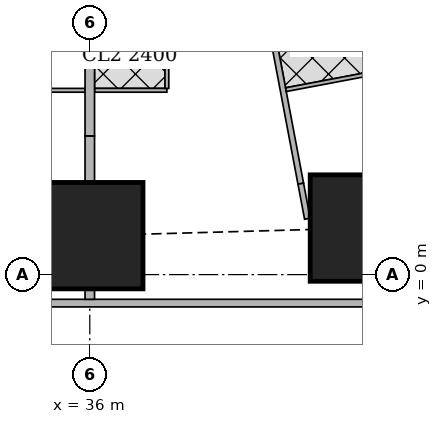
"""IFC4 building model, lengths in metres.
Left out: names, types, materials, properties, quantities, classifications, styles, units other than length and angle.
Written with IfcOpenShell. Run it as: python <this file> out.ifc"""

import sys

from ifc_helpers import new_model, si_unit, direction, frame, frame_2d, origin, origin_2d, place, context, subcontext, project, spatial, rectangle, extrude, element, fill, save


model = new_model("IFC4")
c1 = context("Model", 3, precision=1e-05, world=origin(), true_north=direction((0.0, 1.0)))
c2 = subcontext(c1, "Body", "Model", "MODEL_VIEW")
j1 = project(units=[si_unit("LENGTHUNIT", "METRE"), si_unit("PLANEANGLEUNIT", "RADIAN")], contexts=[c1])
p1 = place(None, origin())
s1 = spatial("IfcSite", under=j1, at=p1, CompositionType="ELEMENT")
p2 = place(p1, origin())
s2 = spatial("IfcBuilding", under=s1, at=p2, CompositionType="ELEMENT")
p3 = place(p2, frame((0.0, 0.0, 53.75)))
s3 = spatial("IfcBuildingStorey", under=s2, at=p3, CompositionType="ELEMENT", Elevation=53.75)
for number, where, z_axis, x_axis in (
    (1, (36.0, 1.025, 0.0), (0.0, 0.0, 1.0), (1.0, 0.0, 0.0)),
    (2, (43.2, 1.225, 0.0), (0.0, 0.0, 1.0), (1.0, 0.0, 0.0)),
):
    element("IfcColumn", number, at=place(p3, frame(where, z_axis=z_axis, x_axis=x_axis)), inside=s3, PredefinedType="COLUMN", context=c2, shape_type="SweptSolid", body=[
        extrude(rectangle(XDim=2.8, YDim=2.8, at=origin_2d()), origin(), (0.0, 0.0, 1.0), 3.75),
    ])
p4 = place(p3, frame((2.163, -0.75, 0.0), z_axis=(0.0, 0.0, 1.0), x_axis=(1.0, 0.0, 0.0)))
e3 = element("IfcWall", 3, at=p4, inside=s3, PredefinedType="SOLIDWALL", context=c2, shape_type="SweptSolid", body=[
    extrude(rectangle(XDim=45.628, YDim=0.2, at=frame_2d((22.814, 0.0))), origin(), (0.0, 0.0, 1.0), 3.5),
])
p5 = place(p4, frame((9.537, 0.0, 0.9)))
e4 = element("IfcOpeningElement", 4, at=p5, cuts=e3, PredefinedType="OPENING", context=c2, shape_type="SweptSolid", body=[
    extrude(rectangle(XDim=1.8, YDim=1.5, at=frame_2d((0.9, 0.75))), frame((0.0, 0.11, 0.0), z_axis=(0.0, -1.0, 0.0), x_axis=(1.0, 0.0, 0.0)), (0.0, 0.0, 1.0), 0.22),
])
p6 = place(p4, frame((13.137, 0.0, 0.9)))
e5 = element("IfcOpeningElement", 5, at=p6, cuts=e3, PredefinedType="OPENING", context=c2, shape_type="SweptSolid", body=[
    extrude(rectangle(XDim=1.8, YDim=1.5, at=frame_2d((0.9, 0.75))), frame((0.0, 0.11, 0.0), z_axis=(0.0, -1.0, 0.0), x_axis=(1.0, 0.0, 0.0)), (0.0, 0.0, 1.0), 0.22),
])
p7 = place(p4, frame((16.737, 0.0, 0.9)))
e6 = element("IfcOpeningElement", 6, at=p7, cuts=e3, PredefinedType="OPENING", context=c2, shape_type="SweptSolid", body=[
    extrude(rectangle(XDim=1.8, YDim=1.5, at=frame_2d((0.9, 0.75))), frame((0.0, 0.11, 0.0), z_axis=(0.0, -1.0, 0.0), x_axis=(1.0, 0.0, 0.0)), (0.0, 0.0, 1.0), 0.22),
])
p8 = place(p4, frame((20.337, 0.0, 0.9)))
e7 = element("IfcOpeningElement", 7, at=p8, cuts=e3, PredefinedType="OPENING", context=c2, shape_type="SweptSolid", body=[
    extrude(rectangle(XDim=1.8, YDim=1.5, at=frame_2d((0.9, 0.75))), frame((0.0, 0.11, 0.0), z_axis=(0.0, -1.0, 0.0), x_axis=(1.0, 0.0, 0.0)), (0.0, 0.0, 1.0), 0.22),
])
p9 = place(p4, frame((23.937, 0.0, 0.9)))
e8 = element("IfcOpeningElement", 8, at=p9, cuts=e3, PredefinedType="OPENING", context=c2, shape_type="SweptSolid", body=[
    extrude(rectangle(XDim=1.8, YDim=1.5, at=frame_2d((0.9, 0.75))), frame((0.0, 0.11, 0.0), z_axis=(0.0, -1.0, 0.0), x_axis=(1.0, 0.0, 0.0)), (0.0, 0.0, 1.0), 0.22),
])
p10 = place(p4, frame((27.537, 0.0, 0.9)))
e9 = element("IfcOpeningElement", 9, at=p10, cuts=e3, PredefinedType="OPENING", context=c2, shape_type="SweptSolid", body=[
    extrude(rectangle(XDim=1.8, YDim=1.5, at=frame_2d((0.9, 0.75))), frame((0.0, 0.11, 0.0), z_axis=(0.0, -1.0, 0.0), x_axis=(1.0, 0.0, 0.0)), (0.0, 0.0, 1.0), 0.22),
])
p11 = place(p4, frame((31.137, 0.0, 0.9)))
e10 = element("IfcOpeningElement", 10, at=p11, cuts=e3, PredefinedType="OPENING", context=c2, shape_type="SweptSolid", body=[
    extrude(rectangle(XDim=1.8, YDim=1.5, at=frame_2d((0.9, 0.75))), frame((0.0, 0.11, 0.0), z_axis=(0.0, -1.0, 0.0), x_axis=(1.0, 0.0, 0.0)), (0.0, 0.0, 1.0), 0.22),
])
p12 = place(p4, frame((34.737, 0.0, 0.9)))
e11 = element("IfcOpeningElement", 11, at=p12, cuts=e3, PredefinedType="OPENING", context=c2, shape_type="SweptSolid", body=[
    extrude(rectangle(XDim=1.8, YDim=1.5, at=frame_2d((0.9, 0.75))), frame((0.0, 0.11, 0.0), z_axis=(0.0, -1.0, 0.0), x_axis=(1.0, 0.0, 0.0)), (0.0, 0.0, 1.0), 0.22),
])
p13 = place(p3, frame((50.653, 2.703, 0.0), z_axis=(0.0, 0.0, 1.0), x_axis=(-0.185612026696, 0.982623109613, 0.0)))
e12 = element("IfcWall", 12, at=p13, inside=s3, PredefinedType="SOLIDWALL", context=c2, shape_type="SweptSolid", body=[
    extrude(rectangle(XDim=41.393, YDim=0.2, at=frame_2d((20.697, 0.0))), origin(), (0.0, 0.0, 1.0), 3.5),
])
p14 = place(p13, frame((1.633, 0.0, 0.9)))
e13 = element("IfcOpeningElement", 13, at=p14, cuts=e12, PredefinedType="OPENING", context=c2, shape_type="SweptSolid", body=[
    extrude(rectangle(XDim=1.8, YDim=1.5, at=frame_2d((0.9, 0.75))), frame((0.0, 0.11, 0.0), z_axis=(0.0, -1.0, 0.0), x_axis=(1.0, 0.0, 0.0)), (0.0, 0.0, 1.0), 0.22),
])
p15 = place(p13, frame((6.032, 0.0, 0.9)))
e14 = element("IfcOpeningElement", 14, at=p15, cuts=e12, PredefinedType="OPENING", context=c2, shape_type="SweptSolid", body=[
    extrude(rectangle(XDim=1.8, YDim=1.5, at=frame_2d((0.9, 0.75))), frame((0.0, 0.11, 0.0), z_axis=(0.0, -1.0, 0.0), x_axis=(1.0, 0.0, 0.0)), (0.0, 0.0, 1.0), 0.22),
])
p16 = place(p13, frame((9.848, 0.0, 0.9)))
e15 = element("IfcOpeningElement", 15, at=p16, cuts=e12, PredefinedType="OPENING", context=c2, shape_type="SweptSolid", body=[
    extrude(rectangle(XDim=1.8, YDim=1.5, at=frame_2d((0.9, 0.75))), frame((0.0, 0.11, 0.0), z_axis=(0.0, -1.0, 0.0), x_axis=(1.0, 0.0, 0.0)), (0.0, 0.0, 1.0), 0.22),
])
p17 = place(p13, frame((17.481, 0.0, 0.9)))
e16 = element("IfcOpeningElement", 16, at=p17, cuts=e12, PredefinedType="OPENING", context=c2, shape_type="SweptSolid", body=[
    extrude(rectangle(XDim=1.8, YDim=1.5, at=frame_2d((0.9, 0.75))), frame((0.0, 0.11, 0.0), z_axis=(0.0, -1.0, 0.0), x_axis=(1.0, 0.0, 0.0)), (0.0, 0.0, 1.0), 0.22),
])
p18 = place(p13, frame((21.297, 0.0, 0.9)))
e17 = element("IfcOpeningElement", 17, at=p18, cuts=e12, PredefinedType="OPENING", context=c2, shape_type="SweptSolid", body=[
    extrude(rectangle(XDim=1.8, YDim=1.5, at=frame_2d((0.9, 0.75))), frame((0.0, 0.11, 0.0), z_axis=(0.0, -1.0, 0.0), x_axis=(1.0, 0.0, 0.0)), (0.0, 0.0, 1.0), 0.22),
])
p19 = place(p13, frame((25.113, 0.0, 0.9)))
e18 = element("IfcOpeningElement", 18, at=p19, cuts=e12, PredefinedType="OPENING", context=c2, shape_type="SweptSolid", body=[
    extrude(rectangle(XDim=1.8, YDim=1.5, at=frame_2d((0.9, 0.75))), frame((0.0, 0.11, 0.0), z_axis=(0.0, -1.0, 0.0), x_axis=(1.0, 0.0, 0.0)), (0.0, 0.0, 1.0), 0.22),
])
p20 = place(p13, frame((28.93, 0.0, 0.9)))
e19 = element("IfcOpeningElement", 19, at=p20, cuts=e12, PredefinedType="OPENING", context=c2, shape_type="SweptSolid", body=[
    extrude(rectangle(XDim=1.8, YDim=1.5, at=frame_2d((0.9, 0.75))), frame((0.0, 0.11, 0.0), z_axis=(0.0, -1.0, 0.0), x_axis=(1.0, 0.0, 0.0)), (0.0, 0.0, 1.0), 0.22),
])
p21 = place(p13, frame((32.746, 0.0, 0.9)))
e20 = element("IfcOpeningElement", 20, at=p21, cuts=e12, PredefinedType="OPENING", context=c2, shape_type="SweptSolid", body=[
    extrude(rectangle(XDim=1.8, YDim=1.5, at=frame_2d((0.9, 0.75))), frame((0.0, 0.11, 0.0), z_axis=(0.0, -1.0, 0.0), x_axis=(1.0, 0.0, 0.0)), (0.0, 0.0, 1.0), 0.22),
])
p22 = place(p13, frame((36.481, 0.0, 0.9)))
e21 = element("IfcOpeningElement", 21, at=p22, cuts=e12, PredefinedType="OPENING", context=c2, shape_type="SweptSolid", body=[
    extrude(rectangle(XDim=1.8, YDim=1.5, at=frame_2d((0.9, 0.75))), frame((0.0, 0.11, 0.0), z_axis=(0.0, -1.0, 0.0), x_axis=(1.0, 0.0, 0.0)), (0.0, 0.0, 1.0), 0.22),
])
p23 = place(p3, frame((35.094, 36.585, 0.0), z_axis=(0.0, 0.0, 1.0), x_axis=(0.185588860311, -0.982627485331, 0.0)))
e22 = element("IfcWall", 22, at=p23, inside=s3, PredefinedType="SOLIDWALL", context=c2, shape_type="SweptSolid", body=[
    extrude(rectangle(XDim=34.797, YDim=0.15, at=frame_2d((17.399, 0.0))), origin(), (0.0, 0.0, 1.0), 2.5),
])
p24 = place(p23, frame((9.828, 0.0, 0.0)))
e23 = element("IfcOpeningElement", 23, at=p24, cuts=e22, PredefinedType="OPENING", context=c2, shape_type="SweptSolid", body=[
    extrude(rectangle(XDim=1.0, YDim=2.1, at=frame_2d((0.5, 1.05))), frame((0.0, 0.085, 0.0), z_axis=(0.0, -1.0, 0.0), x_axis=(1.0, 0.0, 0.0)), (0.0, 0.0, 1.0), 0.17),
])
p25 = place(p23, frame((13.645, 0.0, 0.0)))
e24 = element("IfcOpeningElement", 24, at=p25, cuts=e22, PredefinedType="OPENING", context=c2, shape_type="SweptSolid", body=[
    extrude(rectangle(XDim=1.0, YDim=2.1, at=frame_2d((0.5, 1.05))), frame((0.0, 0.085, 0.0), z_axis=(0.0, -1.0, 0.0), x_axis=(1.0, 0.0, 0.0)), (0.0, 0.0, 1.0), 0.17),
])
p26 = place(p23, frame((25.9, 0.0, 0.0)))
e25 = element("IfcOpeningElement", 25, at=p26, cuts=e22, PredefinedType="OPENING", context=c2, shape_type="SweptSolid", body=[
    extrude(rectangle(XDim=1.0, YDim=2.1, at=frame_2d((0.5, 1.05))), frame((0.0, 0.085, 0.0), z_axis=(0.0, -1.0, 0.0), x_axis=(1.0, 0.0, 0.0)), (0.0, 0.0, 1.0), 0.17),
])
p27 = place(p3, frame((41.552, 2.392, 0.0), z_axis=(0.0, 0.0, 1.0), x_axis=(0.185687800081, -0.982608793417, 0.0)))
e26 = element("IfcWall", 26, at=p27, inside=s3, PredefinedType="SOLIDWALL", context=c2, shape_type="SweptSolid", body=[
    extrude(rectangle(XDim=0.938, YDim=0.15, at=frame_2d((0.469, 0.0))), origin(), (0.0, 0.0, 1.0), 2.05),
])
p28 = place(p3, frame((35.875, 4.85, 0.0), z_axis=(0.0, 0.0, 1.0), x_axis=(-1.0, 0.0, 0.0)))
e27 = element("IfcWall", 27, at=p28, inside=s3, PredefinedType="PARTITIONING", context=c2, shape_type="SweptSolid", body=[
    extrude(rectangle(XDim=3.475, YDim=0.1, at=frame_2d((1.738, 0.0))), origin(), (0.0, 0.0, 1.0), 3.5),
])
p29 = place(p28, frame((1.92, 0.0, 0.0)))
e28 = element("IfcOpeningElement", 28, at=p29, cuts=e27, PredefinedType="OPENING", context=c2, shape_type="SweptSolid", body=[
    extrude(rectangle(XDim=0.9, YDim=2.1, at=frame_2d((0.45, 1.05))), frame((0.0, 0.06, 0.0), z_axis=(0.0, -1.0, 0.0), x_axis=(1.0, 0.0, 0.0)), (0.0, 0.0, 1.0), 0.12),
])
p30 = place(p28, frame((0.15, 0.0, 0.0)))
e29 = element("IfcOpeningElement", 29, at=p30, cuts=e27, PredefinedType="OPENING", context=c2, shape_type="SweptSolid", body=[
    extrude(rectangle(XDim=0.9, YDim=2.1, at=frame_2d((0.45, 1.05))), frame((0.0, 0.06, 0.0), z_axis=(0.0, -1.0, 0.0), x_axis=(1.0, 0.0, 0.0)), (0.0, 0.0, 1.0), 0.12),
])
p31 = place(p3, frame((38.029, 4.85, 0.0), z_axis=(0.0, 0.0, 1.0), x_axis=(-1.0, 0.0, 0.0)))
e30 = element("IfcWall", 30, at=p31, inside=s3, PredefinedType="PARTITIONING", context=c2, shape_type="SweptSolid", body=[
    extrude(rectangle(XDim=1.904, YDim=0.1, at=frame_2d((0.952, 0.0))), origin(), (0.0, 0.0, 1.0), 3.5),
])
p32 = place(p31, frame((0.579, 0.0, 0.0)))
e31 = element("IfcOpeningElement", 31, at=p32, cuts=e30, PredefinedType="OPENING", context=c2, shape_type="SweptSolid", body=[
    extrude(rectangle(XDim=0.9, YDim=2.1, at=frame_2d((0.45, 1.05))), frame((0.0, 0.06, 0.0), z_axis=(0.0, -1.0, 0.0), x_axis=(1.0, 0.0, 0.0)), (0.0, 0.0, 1.0), 0.12),
])
p33 = place(p3, frame((38.029, 4.9, 0.0), z_axis=(0.0, 0.0, 1.0), x_axis=(0.0, 1.0, 0.0)))
e32 = element("IfcWall", 32, at=p33, inside=s3, PredefinedType="PARTITIONING", context=c2, shape_type="SweptSolid", body=[
    extrude(rectangle(XDim=3.275, YDim=0.1, at=frame_2d((1.638, 0.0))), origin(), (0.0, 0.0, 1.0), 3.5),
])
p34 = place(p3, frame((36.0, -0.65, 0.0), z_axis=(0.0, 0.0, 1.0), x_axis=(0.0, 1.0, 0.0)))
e33 = element("IfcWall", 33, at=p34, inside=s3, PredefinedType="SOLIDWALL", context=c2, shape_type="SweptSolid", body=[
    extrude(rectangle(XDim=0.274, YDim=0.25, at=frame_2d((0.137, 0.0))), origin(), (0.0, 0.0, 1.0), 3.5),
])
p35 = place(p3, frame((36.0, 2.426, 0.0), z_axis=(0.0, 0.0, 1.0), x_axis=(0.0, 1.0, 0.0)))
e34 = element("IfcWall", 34, at=p35, inside=s3, PredefinedType="SOLIDWALL", context=c2, shape_type="SweptSolid", body=[
    extrude(rectangle(XDim=1.224, YDim=0.25, at=frame_2d((0.612, 0.0))), origin(), (0.0, 0.0, 1.0), 3.5),
])
p36 = place(p3, frame((36.0, 3.65, 0.0), z_axis=(0.0, 0.0, 1.0), x_axis=(0.0, 1.0, 0.0)))
e35 = element("IfcWall", 35, at=p36, inside=s3, PredefinedType="SOLIDWALL", context=c2, shape_type="SweptSolid", body=[
    extrude(rectangle(XDim=2.949, YDim=0.25, at=frame_2d((1.475, 0.0))), origin(), (0.0, 0.0, 1.0), 3.5),
])
p37 = place(p3, frame((44.379, 5.474, 0.0), z_axis=(0.0, 0.0, 1.0), x_axis=(-0.982607026909, -0.185697147715, 0.0)))
e36 = element("IfcWall", 36, at=p37, inside=s3, PredefinedType="PARTITIONING", context=c2, shape_type="SweptSolid", body=[
    extrude(rectangle(XDim=3.275, YDim=0.1, at=frame_2d((1.637, 0.0))), origin(), (0.0, 0.0, 1.0), 3.5),
])
p38 = place(p11, origin())
e37 = element("IfcWindow", 37, at=p38, inside=s3, PartitioningType="SINGLE_PANEL", PredefinedType="WINDOW", context=c2, shape_type="SweptSolid", body=[
    extrude(rectangle(XDim=1.8, YDim=1.5, at=frame_2d((0.9, 0.75))), frame((0.0, 0.03, 0.0), z_axis=(0.0, -1.0, 0.0), x_axis=(1.0, 0.0, 0.0)), (0.0, 0.0, 1.0), 0.06),
])
fill(e10, e37)
p39 = place(p12, origin())
e38 = element("IfcWindow", 38, at=p39, inside=s3, PartitioningType="SINGLE_PANEL", PredefinedType="WINDOW", context=c2, shape_type="SweptSolid", body=[
    extrude(rectangle(XDim=1.8, YDim=1.5, at=frame_2d((0.9, 0.75))), frame((0.0, 0.03, 0.0), z_axis=(0.0, -1.0, 0.0), x_axis=(1.0, 0.0, 0.0)), (0.0, 0.0, 1.0), 0.06),
])
fill(e11, e38)
p40 = place(p30, origin())
e39 = element("IfcDoor", 39, at=p40, inside=s3, OperationType="SINGLE_SWING_RIGHT", PredefinedType="DOOR", context=c2, shape_type="SweptSolid", body=[
    extrude(rectangle(XDim=0.9, YDim=2.1, at=frame_2d((0.45, 1.05))), frame((0.0, 0.025, 0.0), z_axis=(0.0, -1.0, 0.0), x_axis=(1.0, 0.0, 0.0)), (0.0, 0.0, 1.0), 0.05),
])
fill(e29, e39)
p41 = place(p32, origin())
e40 = element("IfcDoor", 40, at=p41, inside=s3, OperationType="SINGLE_SWING_LEFT", PredefinedType="DOOR", context=c2, shape_type="SweptSolid", body=[
    extrude(rectangle(XDim=0.9, YDim=2.1, at=frame_2d((0.45, 1.05))), frame((0.0, 0.025, 0.0), z_axis=(0.0, -1.0, 0.0), x_axis=(1.0, 0.0, 0.0)), (0.0, 0.0, 1.0), 0.05),
])
fill(e31, e40)
save(model, sys.argv[1])
